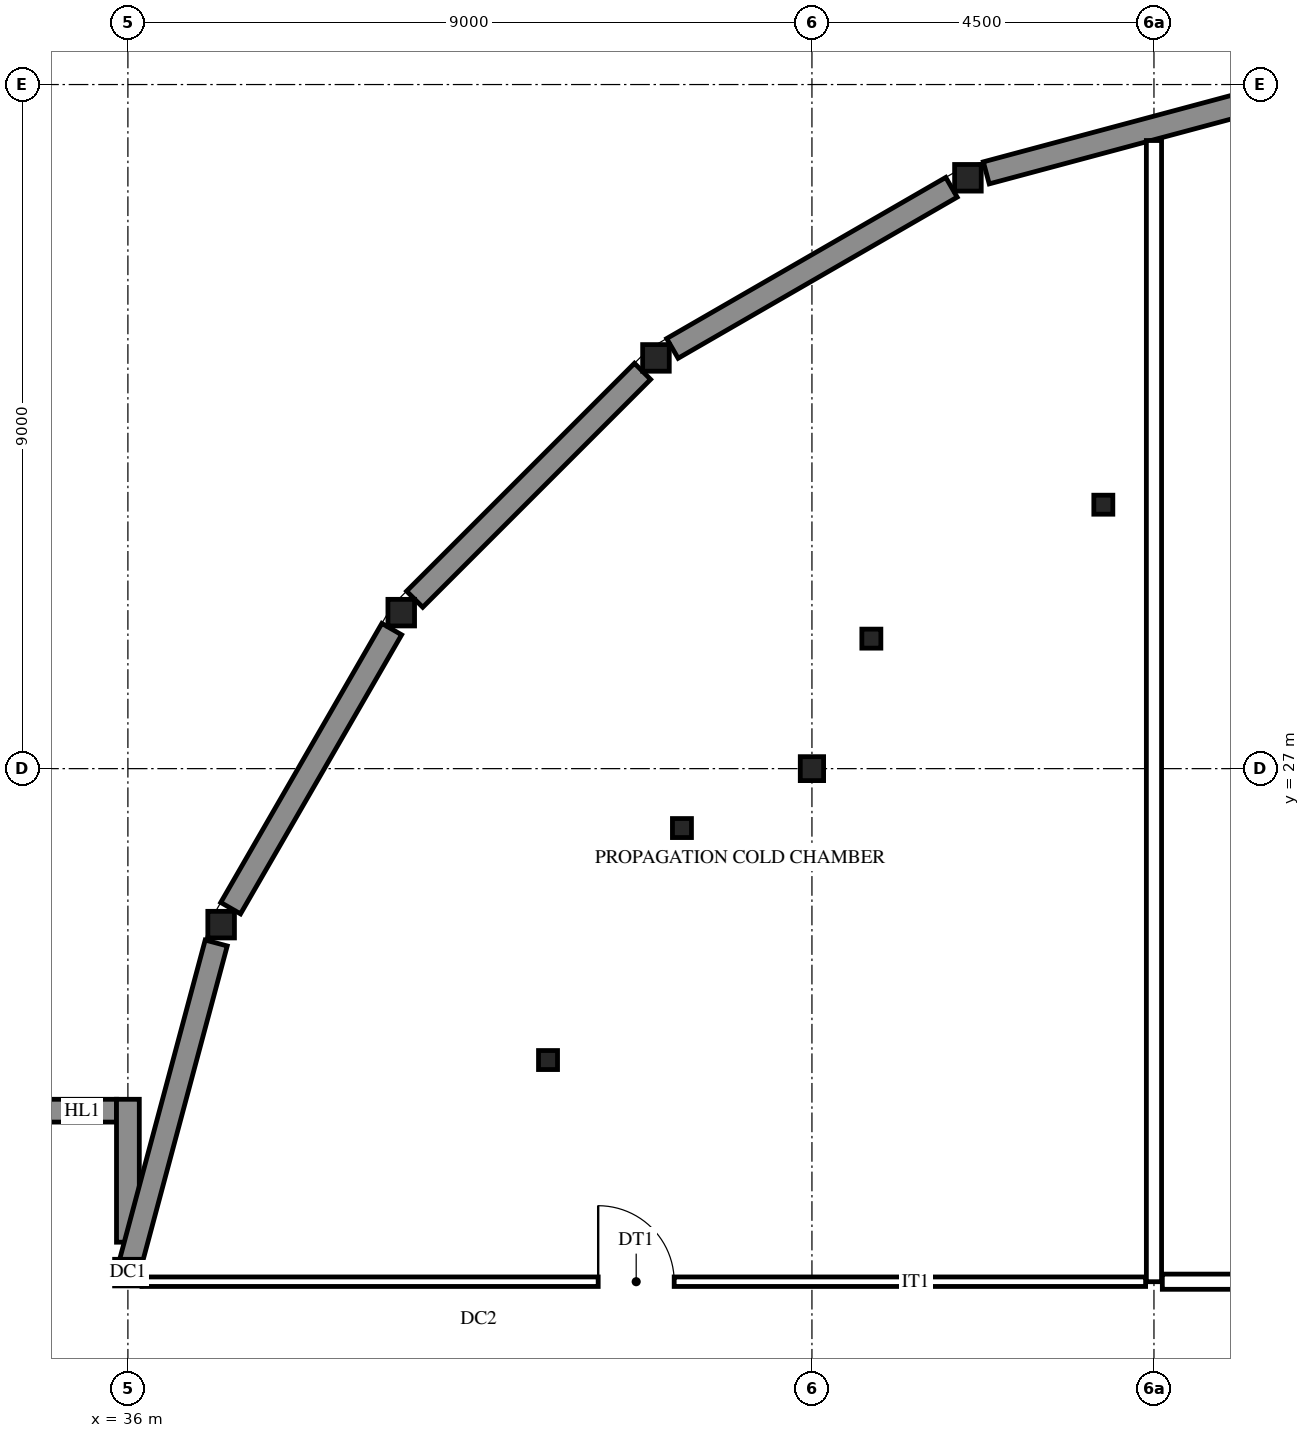
"""IFC4 building model, lengths in metres.
Left out: names, types, materials, properties, quantities, classifications, styles, units other than length and angle.
Written with IfcOpenShell. Run it as: python <this file> out.ifc"""

import sys

from ifc_helpers import new_model, si_unit, direction, frame, frame_2d, origin, origin_2d, place, context, subcontext, project, spatial, rectangle, hollow_rectangle, i_section, extrude, element, fill, save


model = new_model("IFC4")
c1 = context("Model", 3, precision=1e-05, world=origin(), true_north=direction((0.0, 1.0)))
c2 = subcontext(c1, "Body", "Model", "MODEL_VIEW")
j1 = project(units=[si_unit("LENGTHUNIT", "METRE"), si_unit("PLANEANGLEUNIT", "RADIAN")], contexts=[c1])
p1 = place(None, origin())
s1 = spatial("IfcSite", under=j1, at=p1, CompositionType="ELEMENT")
p2 = place(p1, origin())
s2 = spatial("IfcBuilding", under=s1, at=p2, CompositionType="ELEMENT")
p3 = place(p2, frame((0.0, 0.0, -5.0)))
s3 = spatial("IfcBuildingStorey", under=s2, at=p3, CompositionType="ELEMENT", Elevation=-5.0)
p4 = place(p3, frame((45.0, 27.0, -0.4), z_axis=(0.0, 0.0, 1.0), x_axis=(1.0, 0.0, 0.0)))
e1 = element("IfcColumn", 1, at=p4, inside=s3, PredefinedType="COLUMN", context=c2, shape_type="SweptSolid", body=[
    extrude(i_section(OverallWidth=0.307, OverallDepth=0.315, WebThickness=0.012, FlangeThickness=0.019, FilletRadius=0.017, at=origin_2d()), origin(), (0.0, 0.0, 1.0), 5.4),
])
p5 = place(p3, frame((31.35, 22.5, 0.0), z_axis=(0.0, 0.0, 1.0), x_axis=(1.0, 0.0, 0.0)))
e2 = element("IfcWall", 2, at=p5, inside=s3, PredefinedType="SOLIDWALL", context=c2, shape_type="SweptSolid", body=[
    extrude(rectangle(XDim=4.5, YDim=0.3, at=frame_2d((2.25, 0.0))), origin(), (0.0, 0.0, 1.0), 5.0),
])
p6 = place(p3, frame((36.0, 22.65, 0.0), z_axis=(0.0, 0.0, 1.0), x_axis=(0.0, -1.0, 0.0)))
e3 = element("IfcWall", 3, at=p6, inside=s3, PredefinedType="SOLIDWALL", context=c2, shape_type="SweptSolid", body=[
    extrude(rectangle(XDim=1.88, YDim=0.3, at=frame_2d((0.94, 0.0))), origin(), (0.0, 0.0, 1.0), 5.0),
])
p7 = place(p3, frame((36.026, 20.466, 0.0), z_axis=(0.0, 0.0, 1.0), x_axis=(0.258846359831, 0.965918506916, 0.0)))
e4 = element("IfcWall", 4, at=p7, inside=s3, PredefinedType="SOLIDWALL", context=c2, shape_type="SweptSolid", body=[
    extrude(rectangle(XDim=4.39, YDim=0.3, at=frame_2d((2.195, 0.0))), origin(), (0.0, 0.0, 1.0), 5.0),
])
p8 = place(p3, frame((37.352, 25.164, 0.0), z_axis=(0.0, 0.0, 1.0), x_axis=(0.499991648869, 0.866030225258, 0.0)))
e5 = element("IfcWall", 5, at=p8, inside=s3, PredefinedType="SOLIDWALL", context=c2, shape_type="SweptSolid", body=[
    extrude(rectangle(XDim=4.239, YDim=0.3, at=frame_2d((2.12, 0.0))), origin(), (0.0, 0.0, 1.0), 5.0),
])
p9 = place(p3, frame((39.773, 29.229, 0.0), z_axis=(0.0, 0.0, 1.0), x_axis=(0.707106781187, 0.707106781187, 0.0)))
e6 = element("IfcWall", 6, at=p9, inside=s3, PredefinedType="SOLIDWALL", context=c2, shape_type="SweptSolid", body=[
    extrude(rectangle(XDim=4.24, YDim=0.3, at=frame_2d((2.12, 0.0))), origin(), (0.0, 0.0, 1.0), 5.0),
])
p10 = place(p3, frame((43.164, 32.529, 0.0), z_axis=(0.0, 0.0, 1.0), x_axis=(0.866030225258, 0.499991648869, 0.0)))
e7 = element("IfcWall", 7, at=p10, inside=s3, PredefinedType="SOLIDWALL", context=c2, shape_type="SweptSolid", body=[
    extrude(rectangle(XDim=4.239, YDim=0.3, at=frame_2d((2.12, 0.0))), origin(), (0.0, 0.0, 1.0), 5.0),
])
p11 = place(p3, frame((47.294, 34.838, 0.0), z_axis=(0.0, 0.0, 1.0), x_axis=(0.965919776125, 0.258841623565, 0.0)))
e8 = element("IfcWall", 8, at=p11, inside=s3, PredefinedType="SOLIDWALL", context=c2, shape_type="SweptSolid", body=[
    extrude(rectangle(XDim=4.24, YDim=0.3, at=frame_2d((2.12, 0.0))), origin(), (0.0, 0.0, 1.0), 5.0),
])
for number, where, z_axis, x_axis in (
    (9, (47.052, 34.773, -0.4), (0.0, 0.0, 1.0), (1.0, 0.0, 0.0)),
    (10, (42.948, 32.404, -0.4), (0.0, 0.0, 1.0), (1.0, 0.0, 0.0)),
    (11, (39.596, 29.052, -0.4), (0.0, 0.0, 1.0), (1.0, 0.0, 0.0)),
    (12, (37.227, 24.948, -0.4), (0.0, 0.0, 1.0), (1.0, 0.0, 0.0)),
    (13, (36.0, 20.37, -0.4), (0.0, 0.0, 1.0), (1.0, 0.0, 0.0)),
):
    element("IfcColumn", number, at=place(p3, frame(where, z_axis=z_axis, x_axis=x_axis)), inside=s3, PredefinedType="COLUMN", context=c2, shape_type="SweptSolid", body=[
        extrude(hollow_rectangle(XDim=0.35, YDim=0.35, WallThickness=0.012, InnerFilletRadius=0.019, OuterFilletRadius=0.031, at=origin_2d()), origin(), (0.0, 0.0, 1.0), 5.4),
    ])
for number, where, z_axis, x_axis in (
    (14, (48.834, 30.472, -0.4), (0.0, 0.0, 1.0), (1.0, 0.0, 0.0)),
    (15, (45.782, 28.71, -0.4), (0.0, 0.0, 1.0), (1.0, 0.0, 0.0)),
    (16, (43.29, 26.218, -0.4), (0.0, 0.0, 1.0), (1.0, 0.0, 0.0)),
    (17, (41.528, 23.166, -0.4), (0.0, 0.0, 1.0), (1.0, 0.0, 0.0)),
    (18, (40.615, 19.762, -0.4), (0.0, 0.0, 1.0), (1.0, 0.0, 0.0)),
    (19, (35.4, 22.5, -0.4), (0.0, 0.0, 1.0), (1.0, 0.0, 0.0)),
):
    element("IfcColumn", number, at=place(p3, frame(where, z_axis=z_axis, x_axis=x_axis)), inside=s3, PredefinedType="COLUMN", context=c2, shape_type="SweptSolid", body=[
        extrude(hollow_rectangle(XDim=0.25, YDim=0.25, WallThickness=0.009, InnerFilletRadius=0.013, OuterFilletRadius=0.022, at=origin_2d()), origin(), (0.0, 0.0, 1.0), 5.4),
    ])
p12 = place(p3, frame((49.5, 20.25, 0.0), z_axis=(0.0, 0.0, 1.0), x_axis=(0.0, 1.0, 0.0)))
e20 = element("IfcWall", 20, at=p12, inside=s3, PredefinedType="PARTITIONING", context=c2, shape_type="SweptSolid", body=[
    extrude(rectangle(XDim=15.013, YDim=0.2, at=frame_2d((7.507, 0.0))), origin(), (0.0, 0.0, 1.0), 4.496),
])
p13 = place(p3, frame((36.185, 20.25, 0.0), z_axis=(0.0, 0.0, 1.0), x_axis=(1.0, 0.0, 0.0)))
e21 = element("IfcWall", 21, at=p13, inside=s3, PredefinedType="PARTITIONING", context=c2, shape_type="SweptSolid", body=[
    extrude(rectangle(XDim=13.205, YDim=0.125, at=frame_2d((6.603, 0.0))), origin(), (0.0, 0.0, 1.0), 4.496),
])
p14 = place(p13, frame((6.003, 0.0, 0.0)))
e22 = element("IfcOpeningElement", 22, at=p14, cuts=e21, PredefinedType="OPENING", context=c2, shape_type="SweptSolid", body=[
    extrude(rectangle(XDim=1.0, YDim=2.1, at=frame_2d((0.5, 1.05))), frame((0.0, 0.073, 0.0), z_axis=(0.0, -1.0, 0.0), x_axis=(1.0, 0.0, 0.0)), (0.0, 0.0, 1.0), 0.145),
])
p15 = place(p3, frame((49.61, 20.25, 0.0), z_axis=(0.0, 0.0, 1.0), x_axis=(1.0, 0.0, 0.0)))
e23 = element("IfcWall", 23, at=p15, inside=s3, PredefinedType="PARTITIONING", context=c2, shape_type="SweptSolid", body=[
    extrude(rectangle(XDim=13.39, YDim=0.2, at=frame_2d((6.695, 0.0))), origin(), (0.0, 0.0, 1.0), 4.496),
])
p16 = place(p15, frame((5.74, 0.0, 0.0)))
e24 = element("IfcOpeningElement", 24, at=p16, cuts=e23, PredefinedType="OPENING", context=c2, shape_type="SweptSolid", body=[
    extrude(rectangle(XDim=1.8, YDim=2.1, at=frame_2d((0.9, 1.05))), frame((0.0, 0.11, 0.0), z_axis=(0.0, -1.0, 0.0), x_axis=(1.0, 0.0, 0.0)), (0.0, 0.0, 1.0), 0.22),
])
p17 = place(p14, origin())
e25 = element("IfcDoor", 25, at=p17, inside=s3, OperationType="SINGLE_SWING_LEFT", PredefinedType="DOOR", context=c2, shape_type="SweptSolid", body=[
    extrude(rectangle(XDim=1.0, YDim=2.1, at=frame_2d((0.5, 1.05))), frame((0.0, 0.025, 0.0), z_axis=(0.0, -1.0, 0.0), x_axis=(1.0, 0.0, 0.0)), (0.0, 0.0, 1.0), 0.05),
])
fill(e22, e25)
save(model, sys.argv[1])
